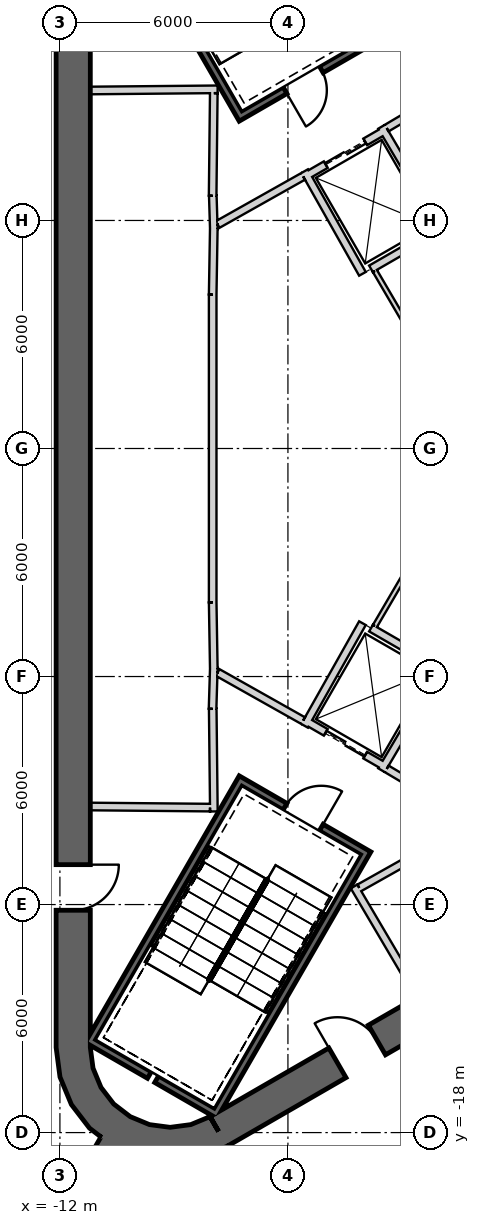
"""IFC4 building model, lengths in metres.
Left out: names, types, materials, properties, quantities, classifications, styles, units other than length and angle.
Written with IfcOpenShell. Run it as: python <this file> out.ifc"""

import sys

from ifc_helpers import new_model, si_unit, direction, frame, frame_2d, origin, place, context, subcontext, project, spatial, polyline, rectangle, outline, extrude, element, fill, save


model = new_model("IFC4")
c1 = context("Model", 3, precision=1e-05, world=origin(), true_north=direction((0.0, 1.0)))
c2 = subcontext(c1, "Body", "Model", "MODEL_VIEW")
j1 = project(units=[si_unit("LENGTHUNIT", "METRE"), si_unit("PLANEANGLEUNIT", "RADIAN")], contexts=[c1])
p1 = place(None, origin())
s1 = spatial("IfcSite", under=j1, at=p1, CompositionType="ELEMENT")
p2 = place(p1, origin())
s2 = spatial("IfcBuilding", under=s1, at=p2, CompositionType="ELEMENT")
p3 = place(p2, frame((0.0, 0.0, 163.2)))
s3 = spatial("IfcBuildingStorey", under=s2, at=p3, CompositionType="ELEMENT", Elevation=163.2)
p4 = place(p3, frame((19.475, 2.208, 0.0), z_axis=(0.0, 0.0, 1.0), x_axis=(-0.866028369851, 0.499994862586, 0.0)))
e1 = element("IfcWall", 1, at=p4, inside=s3, PredefinedType="SHEAR", context=c2, shape_type="SweptSolid", body=[
    extrude(rectangle(XDim=31.523, YDim=0.9, at=frame_2d((15.762, 0.0))), origin(), (0.0, 0.0, 1.0), 6.0),
])
p5 = place(p4, frame((3.612, 0.0, 0.0)))
e2 = element("IfcOpeningElement", 2, at=p5, cuts=e1, PredefinedType="OPENING", context=c2, shape_type="SweptSolid", body=[
    extrude(rectangle(XDim=1.2, YDim=2.4, at=frame_2d((0.6, 1.2))), frame((0.0, 0.46, 0.0), z_axis=(0.0, -1.0, 0.0), x_axis=(1.0, 0.0, 0.0)), (0.0, 0.0, 1.0), 0.92),
])
p6 = place(p4, frame((26.712, 0.0, 0.0)))
e3 = element("IfcOpeningElement", 3, at=p6, cuts=e1, PredefinedType="OPENING", context=c2, shape_type="SweptSolid", body=[
    extrude(rectangle(XDim=1.2, YDim=2.4, at=frame_2d((0.6, 1.2))), frame((0.0, 0.46, 0.0), z_axis=(0.0, -1.0, 0.0), x_axis=(1.0, 0.0, 0.0)), (0.0, 0.0, 1.0), 0.92),
])
p7 = place(p3, frame((-11.65, 15.762, 0.0), z_axis=(0.0, 0.0, 1.0), x_axis=(0.0, -1.0, 0.0)))
e4 = element("IfcWall", 4, at=p7, inside=s3, PredefinedType="SHEAR", context=c2, shape_type="SweptSolid", body=[
    extrude(rectangle(XDim=31.523, YDim=0.9, at=frame_2d((15.762, 0.0))), origin(), (0.0, 0.0, 1.0), 6.0),
])
p8 = place(p7, frame((3.612, 0.0, 0.0)))
e5 = element("IfcOpeningElement", 5, at=p8, cuts=e4, PredefinedType="OPENING", context=c2, shape_type="SweptSolid", body=[
    extrude(rectangle(XDim=1.2, YDim=2.4, at=frame_2d((0.6, 1.2))), frame((0.0, 0.46, 0.0), z_axis=(0.0, -1.0, 0.0), x_axis=(1.0, 0.0, 0.0)), (0.0, 0.0, 1.0), 0.92),
])
p9 = place(p7, frame((26.712, 0.0, 0.0)))
e6 = element("IfcOpeningElement", 6, at=p9, cuts=e4, PredefinedType="OPENING", context=c2, shape_type="SweptSolid", body=[
    extrude(rectangle(XDim=1.2, YDim=2.4, at=frame_2d((0.6, 1.2))), frame((0.0, 0.46, 0.0), z_axis=(0.0, -1.0, 0.0), x_axis=(1.0, 0.0, 0.0)), (0.0, 0.0, 1.0), 0.92),
])
p10 = place(p3, frame((-7.825, -17.97, 0.0), z_axis=(0.0, 0.0, 1.0), x_axis=(0.866028369851, 0.499994862586, 0.0)))
e7 = element("IfcWall", 7, at=p10, inside=s3, PredefinedType="SHEAR", context=c2, shape_type="SweptSolid", body=[
    extrude(rectangle(XDim=31.523, YDim=0.9, at=frame_2d((15.762, 0.0))), origin(), (0.0, 0.0, 1.0), 6.0),
])
p11 = place(p10, frame((26.712, 0.0, 0.0)))
e8 = element("IfcOpeningElement", 8, at=p11, cuts=e7, PredefinedType="OPENING", context=c2, shape_type="SweptSolid", body=[
    extrude(rectangle(XDim=1.2, YDim=2.4, at=frame_2d((0.6, 1.2))), frame((0.0, 0.46, 0.0), z_axis=(0.0, -1.0, 0.0), x_axis=(1.0, 0.0, 0.0)), (0.0, 0.0, 1.0), 0.92),
])
p12 = place(p10, frame((3.612, 0.0, 0.0)))
e9 = element("IfcOpeningElement", 9, at=p12, cuts=e7, PredefinedType="OPENING", context=c2, shape_type="SweptSolid", body=[
    extrude(rectangle(XDim=1.2, YDim=2.4, at=frame_2d((0.6, 1.2))), frame((0.0, 0.46, 0.0), z_axis=(0.0, -1.0, 0.0), x_axis=(1.0, 0.0, 0.0)), (0.0, 0.0, 1.0), 0.92),
])
p13 = place(p3, origin())
e10 = element("IfcWall", 10, at=p13, inside=s3, PredefinedType="SHEAR", context=c2, shape_type="SweptSolid", body=[
    extrude(outline(polyline([(-12.1, -15.762), (-11.998, -16.538), (-11.698, -17.262), (-11.221, -17.883), (-10.6, -18.36), (-9.876, -18.659), (-9.1, -18.762), (-8.323, -18.659), (-7.6, -18.36), (-8.05, -17.58), (-8.556, -17.79), (-9.1, -17.862), (-9.644, -17.79), (-10.15, -17.58), (-10.585, -17.247), (-10.919, -16.812), (-11.128, -16.305), (-11.2, -15.762), (-12.1, -15.762)])), origin(), (0.0, 0.0, 1.0), 6.0),
])
p14 = place(p3, frame((-10.575, -18.316, 0.0), z_axis=(0.0, 0.0, 1.0), x_axis=(-0.500002326941, -0.86602406032, 0.0)))
e11 = element("IfcWall", 11, at=p14, inside=s3, PredefinedType="SHEAR", context=c2, shape_type="SweptSolid", body=[
    extrude(rectangle(XDim=12.384, YDim=0.8, at=frame_2d((6.192, 0.0))), origin(), (0.0, 0.0, 1.0), 6.0),
])
p15 = place(p14, frame((1.2, 0.0, 0.0)))
e12 = element("IfcOpeningElement", 12, at=p15, cuts=e11, PredefinedType="OPENING", context=c2, shape_type="SweptSolid", body=[
    extrude(rectangle(XDim=1.4, YDim=2.4, at=frame_2d((0.7, 1.2))), frame((0.0, 0.41, 0.0), z_axis=(0.0, -1.0, 0.0), x_axis=(1.0, 0.0, 0.0)), (0.0, 0.0, 1.0), 0.82),
])
p16 = place(p3, frame((-3.41, -32.318, 0.0), z_axis=(0.0, 0.0, 1.0), x_axis=(0.852773716093, 0.52228056554, 0.0)))
e13 = element("IfcWall", 13, at=p16, inside=s3, PredefinedType="SOLIDWALL", context=c2, shape_type="SweptSolid", body=[
    extrude(rectangle(XDim=38.239, YDim=0.24, at=frame_2d((19.12, 0.0))), origin(), (0.0, 0.0, 1.0), 5.7),
])
p17 = place(p3, frame((-11.2, 9.42, 0.0), z_axis=(0.0, 0.0, 1.0), x_axis=(0.999957167047, 0.009255488683, 0.0)))
e14 = element("IfcWall", 14, at=p17, inside=s3, PredefinedType="PLUMBINGWALL", context=c2, shape_type="SweptSolid", body=[
    extrude(rectangle(XDim=3.35, YDim=0.2, at=frame_2d((1.675, 0.0))), origin(), (0.0, 0.0, 1.0), 5.7),
])
p18 = place(p3, frame((-7.951, 9.35, 0.0), z_axis=(0.0, 0.0, 1.0), x_axis=(-0.011120469654, -0.999938165666, 0.0)))
e15 = element("IfcWall", 15, at=p18, inside=s3, PredefinedType="PLUMBINGWALL", context=c2, shape_type="SweptSolid", body=[
    extrude(rectangle(XDim=2.7, YDim=0.2, at=frame_2d((1.35, 0.0))), origin(), (0.0, 0.0, 1.0), 5.7),
])
p19 = place(p3, frame((-7.977, 6.65, 0.0), z_axis=(0.0, 0.0, 1.0), x_axis=(0.030861509705, -0.999523670164, 0.0)))
e16 = element("IfcWall", 16, at=p19, inside=s3, PredefinedType="PLUMBINGWALL", context=c2, shape_type="SweptSolid", body=[
    extrude(rectangle(XDim=0.878, YDim=0.2, at=frame_2d((0.439, 0.0))), origin(), (0.0, 0.0, 1.0), 5.7),
])
p20 = place(p3, frame((-7.949, 5.894, 0.0), z_axis=(0.0, 0.0, 1.0), x_axis=(-0.016809909365, -0.999858703491, 0.0)))
e17 = element("IfcWall", 17, at=p20, inside=s3, PredefinedType="PLUMBINGWALL", context=c2, shape_type="SweptSolid", body=[
    extrude(rectangle(XDim=1.844, YDim=0.2, at=frame_2d((0.922, 0.0))), origin(), (0.0, 0.0, 1.0), 5.7),
])
p21 = place(p3, frame((-7.98, 4.05, 0.0), z_axis=(0.0, 0.0, 1.0), x_axis=(0.0, -1.0, 0.0)))
e18 = element("IfcWall", 18, at=p21, inside=s3, PredefinedType="PLUMBINGWALL", context=c2, shape_type="SweptSolid", body=[
    extrude(rectangle(XDim=8.1, YDim=0.2, at=frame_2d((4.05, 0.0))), origin(), (0.0, 0.0, 1.0), 5.7),
])
p22 = place(p3, frame((-7.95, -5.772, 0.0), z_axis=(0.0, 0.0, 1.0), x_axis=(-0.030803413295, -0.999525462272, 0.0)))
e19 = element("IfcWall", 19, at=p22, inside=s3, PredefinedType="PLUMBINGWALL", context=c2, shape_type="SweptSolid", body=[
    extrude(rectangle(XDim=1.078, YDim=0.2, at=frame_2d((0.539, 0.0))), origin(), (0.0, 0.0, 1.0), 5.7),
])
p23 = place(p3, frame((-7.98, -4.05, 0.0), z_axis=(0.0, 0.0, 1.0), x_axis=(0.016809909365, -0.999858703491, 0.0)))
e20 = element("IfcWall", 20, at=p23, inside=s3, PredefinedType="PLUMBINGWALL", context=c2, shape_type="SweptSolid", body=[
    extrude(rectangle(XDim=1.844, YDim=0.2, at=frame_2d((0.922, 0.0))), origin(), (0.0, 0.0, 1.0), 5.7),
])
p24 = place(p3, frame((-7.979, -6.85, 0.0), z_axis=(0.0, 0.0, 1.0), x_axis=(0.011121475088, -0.999938154483, 0.0)))
e21 = element("IfcWall", 21, at=p24, inside=s3, PredefinedType="PLUMBINGWALL", context=c2, shape_type="SweptSolid", body=[
    extrude(rectangle(XDim=2.7, YDim=0.2, at=frame_2d((1.35, 0.0))), origin(), (0.0, 0.0, 1.0), 5.7),
])
p25 = place(p3, frame((-8.05, -9.449, 0.0), z_axis=(0.0, 0.0, 1.0), x_axis=(-0.999957467379, 0.009222983926, 0.0)))
e22 = element("IfcWall", 22, at=p25, inside=s3, PredefinedType="PLUMBINGWALL", context=c2, shape_type="SweptSolid", body=[
    extrude(rectangle(XDim=3.15, YDim=0.2, at=frame_2d((1.575, 0.0))), origin(), (0.0, 0.0, 1.0), 5.7),
])
p26 = place(p3, frame((-2.558, -14.409, 0.0), z_axis=(0.0, 0.0, 1.0), x_axis=(-0.507997497166, 0.861358544901, 0.0)))
e23 = element("IfcWall", 23, at=p26, inside=s3, PredefinedType="PLUMBINGWALL", context=c2, shape_type="SweptSolid", body=[
    extrude(rectangle(XDim=3.35, YDim=0.2, at=frame_2d((1.675, 0.0))), origin(), (0.0, 0.0, 1.0), 5.7),
])
p27 = place(p3, frame((-1.769, -10.237, 0.0), z_axis=(0.0, 0.0, 1.0), x_axis=(-0.871534483978, -0.490334215854, 0.0)))
e24 = element("IfcWall", 24, at=p27, inside=s3, PredefinedType="PLUMBINGWALL", context=c2, shape_type="SweptSolid", body=[
    extrude(rectangle(XDim=2.7, YDim=0.2, at=frame_2d((1.35, 0.0))), origin(), (0.0, 0.0, 1.0), 5.7),
])
p28 = place(p3, frame((-11.245, 15.678, -0.35), z_axis=(0.0, 0.0, 1.0), x_axis=(0.499977274689, -0.866038523851, 0.0)))
e25 = element("IfcWall", 25, at=p28, inside=s3, PredefinedType="SHEAR", context=c2, shape_type="SweptSolid", body=[
    extrude(rectangle(XDim=8.1, YDim=0.2, at=frame_2d((4.05, 0.0))), origin(), (0.0, 0.0, 1.0), 6.05),
])
p29 = place(p3, frame((-7.159, 8.8, -0.35), z_axis=(0.0, 0.0, 1.0), x_axis=(0.866047807691, 0.499961193289, 0.0)))
e26 = element("IfcWall", 26, at=p29, inside=s3, PredefinedType="SHEAR", context=c2, shape_type="SweptSolid", body=[
    extrude(rectangle(XDim=3.6, YDim=0.2, at=frame_2d((1.8, 0.0))), origin(), (0.0, 0.0, 1.0), 6.05),
])
p30 = place(p29, frame((1.25, 0.0, 0.35)))
e27 = element("IfcOpeningElement", 27, at=p30, cuts=e26, PredefinedType="OPENING", context=c2, shape_type="SweptSolid", body=[
    extrude(rectangle(XDim=1.1, YDim=2.1, at=frame_2d((0.55, 1.05))), frame((0.0, 0.11, 0.0), z_axis=(0.0, -1.0, 0.0), x_axis=(1.0, 0.0, 0.0)), (0.0, 0.0, 1.0), 0.22),
])
p31 = place(p3, frame((-5.524, 7.168, 0.0), z_axis=(0.0, 0.0, 1.0), x_axis=(0.866024647952, 0.500001309137, 0.0)))
e28 = element("IfcWall", 28, at=p31, inside=s3, PredefinedType="PLUMBINGWALL", context=c2, shape_type="SweptSolid", body=[
    extrude(rectangle(XDim=2.4, YDim=0.2, at=frame_2d((1.2, 0.0))), origin(), (0.0, 0.0, 1.0), 5.7),
])
p32 = place(p31, frame((0.6, 0.0, 0.0)))
e29 = element("IfcOpeningElement", 29, at=p32, cuts=e28, PredefinedType="OPENING", context=c2, shape_type="SweptSolid", body=[
    extrude(rectangle(XDim=1.2, YDim=2.4, at=frame_2d((0.6, 1.2))), frame((0.0, 0.11, 0.0), z_axis=(0.0, -1.0, 0.0), x_axis=(1.0, 0.0, 0.0)), (0.0, 0.0, 1.0), 0.22),
])
p33 = place(p3, frame((-4.039, 4.596, 0.0), z_axis=(0.0, 0.0, 1.0), x_axis=(-0.491322718731, 0.870977603649, 0.0)))
e30 = element("IfcWall", 30, at=p33, inside=s3, PredefinedType="PLUMBINGWALL", context=c2, shape_type="SweptSolid", body=[
    extrude(rectangle(XDim=3.1, YDim=0.2, at=frame_2d((1.55, 0.0))), origin(), (0.0, 0.0, 1.0), 5.7),
])
p34 = place(p3, frame((-3.538, 8.465, 0.0), z_axis=(0.0, 0.0, 1.0), x_axis=(0.508616218331, -0.860993346345, 0.0)))
e31 = element("IfcWall", 31, at=p34, inside=s3, PredefinedType="PLUMBINGWALL", context=c2, shape_type="SweptSolid", body=[
    extrude(rectangle(XDim=3.2, YDim=0.2, at=frame_2d((1.6, 0.0))), origin(), (0.0, 0.0, 1.0), 5.7),
])
p35 = place(p3, frame((-2.047, 5.746, 0.0), z_axis=(0.0, 0.0, 1.0), x_axis=(-0.866032100247, -0.499988401207, 0.0)))
e32 = element("IfcWall", 32, at=p35, inside=s3, PredefinedType="PLUMBINGWALL", context=c2, shape_type="SweptSolid", body=[
    extrude(rectangle(XDim=2.04, YDim=0.2, at=frame_2d((1.02, 0.0))), origin(), (0.0, 0.0, 1.0), 5.7),
])
p36 = place(p3, frame((-3.905, -10.563, -0.35), z_axis=(0.0, 0.0, 1.0), x_axis=(-0.500012932018, -0.866017937352, 0.0)))
e33 = element("IfcWall", 33, at=p36, inside=s3, PredefinedType="SHEAR", context=c2, shape_type="SweptSolid", body=[
    extrude(rectangle(XDim=8.1, YDim=0.2, at=frame_2d((4.05, 0.0))), origin(), (0.0, 0.0, 1.0), 6.05),
])
p37 = place(p3, frame((-11.282, -15.541, -0.35), z_axis=(0.0, 0.0, 1.0), x_axis=(0.866000578957, -0.500042995397, 0.0)))
e34 = element("IfcWall", 34, at=p37, inside=s3, PredefinedType="SHEAR", context=c2, shape_type="SweptSolid", body=[
    extrude(rectangle(XDim=1.89, YDim=0.2, at=frame_2d((0.945, 0.0))), origin(), (0.0, 0.0, 1.0), 6.05),
])
p38 = place(p3, frame((-9.455, -16.596, -0.35), z_axis=(0.0, 0.0, 1.0), x_axis=(0.866038843867, -0.499976720371, 0.0)))
e35 = element("IfcWall", 35, at=p38, inside=s3, PredefinedType="SHEAR", context=c2, shape_type="SweptSolid", body=[
    extrude(rectangle(XDim=1.69, YDim=0.2, at=frame_2d((0.845, 0.0))), origin(), (0.0, 0.0, 1.0), 6.05),
])
p39 = place(p3, frame((-7.196, -8.663, -0.35), z_axis=(0.0, 0.0, 1.0), x_axis=(-0.499997992926, -0.866026562566, 0.0)))
e36 = element("IfcWall", 36, at=p39, inside=s3, PredefinedType="SHEAR", context=c2, shape_type="SweptSolid", body=[
    extrude(rectangle(XDim=7.9, YDim=0.2, at=frame_2d((3.95, 0.0))), origin(), (0.0, 0.0, 1.0), 6.05),
])
p40 = place(p3, frame((-4.041, -10.599, -0.35), z_axis=(0.0, 0.0, 1.0), x_axis=(-0.866047807691, 0.499961193289, 0.0)))
e37 = element("IfcWall", 37, at=p40, inside=s3, PredefinedType="SHEAR", context=c2, shape_type="SweptSolid", body=[
    extrude(rectangle(XDim=3.6, YDim=0.2, at=frame_2d((1.8, 0.0))), origin(), (0.0, 0.0, 1.0), 6.05),
])
p41 = place(p40, frame((1.25, 0.0, 0.35)))
e38 = element("IfcOpeningElement", 38, at=p41, cuts=e37, PredefinedType="OPENING", context=c2, shape_type="SweptSolid", body=[
    extrude(rectangle(XDim=1.1, YDim=2.1, at=frame_2d((0.55, 1.05))), frame((0.0, 0.11, 0.0), z_axis=(0.0, -1.0, 0.0), x_axis=(1.0, 0.0, 0.0)), (0.0, 0.0, 1.0), 0.22),
])
p42 = place(p3, frame((-3.446, -8.368, 0.0), z_axis=(0.0, 0.0, 1.0), x_axis=(-0.866024647952, 0.500001309137, 0.0)))
e39 = element("IfcWall", 39, at=p42, inside=s3, PredefinedType="PLUMBINGWALL", context=c2, shape_type="SweptSolid", body=[
    extrude(rectangle(XDim=2.4, YDim=0.2, at=frame_2d((1.2, 0.0))), origin(), (0.0, 0.0, 1.0), 5.7),
])
p43 = place(p42, frame((0.6, 0.0, 0.0)))
e40 = element("IfcOpeningElement", 40, at=p43, cuts=e39, PredefinedType="OPENING", context=c2, shape_type="SweptSolid", body=[
    extrude(rectangle(XDim=1.2, YDim=2.4, at=frame_2d((0.6, 1.2))), frame((0.0, 0.11, 0.0), z_axis=(0.0, -1.0, 0.0), x_axis=(1.0, 0.0, 0.0)), (0.0, 0.0, 1.0), 0.22),
])
p44 = place(p3, frame((-5.562, -7.296, 0.0), z_axis=(0.0, 0.0, 1.0), x_axis=(0.491322718731, 0.870977603649, 0.0)))
e41 = element("IfcWall", 41, at=p44, inside=s3, PredefinedType="PLUMBINGWALL", context=c2, shape_type="SweptSolid", body=[
    extrude(rectangle(XDim=3.1, YDim=0.2, at=frame_2d((1.55, 0.0))), origin(), (0.0, 0.0, 1.0), 5.7),
])
p45 = place(p3, frame((-3.814, -4.726, 0.0), z_axis=(0.0, 0.0, 1.0), x_axis=(0.866000409959, -0.500043288077, 0.0)))
e42 = element("IfcWall", 42, at=p45, inside=s3, PredefinedType="PLUMBINGWALL", context=c2, shape_type="SweptSolid", body=[
    extrude(rectangle(XDim=2.24, YDim=0.2, at=frame_2d((1.12, 0.0))), origin(), (0.0, 0.0, 1.0), 5.7),
])
p46 = place(p3, frame((-2.012, -5.882, 0.0), z_axis=(0.0, 0.0, 1.0), x_axis=(-0.508619639323, -0.860991325447, 0.0)))
e43 = element("IfcWall", 43, at=p46, inside=s3, PredefinedType="PLUMBINGWALL", context=c2, shape_type="SweptSolid", body=[
    extrude(rectangle(XDim=3.0, YDim=0.2, at=frame_2d((1.5, 0.0))), origin(), (0.0, 0.0, 1.0), 5.7),
])
p47 = place(p3, frame((-4.296, 11.659, 0.0), z_axis=(0.0, 0.0, 1.0), x_axis=(0.871534483978, -0.490334215854, 0.0)))
e44 = element("IfcWall", 44, at=p47, inside=s3, PredefinedType="PARTITIONING", context=c2, shape_type="SweptSolid", body=[
    extrude(rectangle(XDim=2.7, YDim=0.2, at=frame_2d((1.35, 0.0))), origin(), (0.0, 0.0, 1.0), 5.7),
])
p48 = place(p3, frame((-5.6, 7.16, 0.0), z_axis=(0.0, 0.0, 1.0), x_axis=(-0.871340486379, -0.490678873396, 0.0)))
e45 = element("IfcWall", 45, at=p48, inside=s3, PredefinedType="PARTITIONING", context=c2, shape_type="SweptSolid", body=[
    extrude(rectangle(XDim=2.581, YDim=0.2, at=frame_2d((1.291, 0.0))), origin(), (0.0, 0.0, 1.0), 5.7),
])
p49 = place(p3, frame((-1.07, 9.809, 0.0), z_axis=(0.0, 0.0, 1.0), x_axis=(-0.860603293832, -0.509275927808, 0.0)))
e46 = element("IfcWall", 46, at=p49, inside=s3, PredefinedType="PARTITIONING", context=c2, shape_type="SweptSolid", body=[
    extrude(rectangle(XDim=2.708, YDim=0.2, at=frame_2d((1.354, 0.0))), origin(), (0.0, 0.0, 1.0), 5.7),
])
p50 = place(p49, frame((0.86, 0.0, 0.0)))
e47 = element("IfcOpeningElement", 47, at=p50, cuts=e46, PredefinedType="OPENING", context=c2, shape_type="SweptSolid", body=[
    extrude(rectangle(XDim=1.0, YDim=2.1, at=frame_2d((0.5, 1.05))), frame((0.0, 0.11, 0.0), z_axis=(0.0, -1.0, 0.0), x_axis=(1.0, 0.0, 0.0)), (0.0, 0.0, 1.0), 0.22),
])
p51 = place(p3, frame((-7.849, -5.894, 0.0), z_axis=(0.0, 0.0, 1.0), x_axis=(0.871340486379, -0.490678873396, 0.0)))
e48 = element("IfcWall", 48, at=p51, inside=s3, PredefinedType="PARTITIONING", context=c2, shape_type="SweptSolid", body=[
    extrude(rectangle(XDim=2.581, YDim=0.2, at=frame_2d((1.291, 0.0))), origin(), (0.0, 0.0, 1.0), 5.7),
])
p52 = place(p3, frame((-3.401, -8.43, 0.0), z_axis=(0.0, 0.0, 1.0), x_axis=(0.860598681535, -0.509283721849, 0.0)))
e49 = element("IfcWall", 49, at=p52, inside=s3, PredefinedType="PARTITIONING", context=c2, shape_type="SweptSolid", body=[
    extrude(rectangle(XDim=2.581, YDim=0.2, at=frame_2d((1.291, 0.0))), origin(), (0.0, 0.0, 1.0), 5.7),
])
p53 = place(p52, frame((0.791, 0.0, 0.0)))
e50 = element("IfcOpeningElement", 50, at=p53, cuts=e49, PredefinedType="OPENING", context=c2, shape_type="SweptSolid", body=[
    extrude(rectangle(XDim=1.0, YDim=2.1, at=frame_2d((0.5, 1.05))), frame((0.0, 0.11, 0.0), z_axis=(0.0, -1.0, 0.0), x_axis=(1.0, 0.0, 0.0)), (0.0, 0.0, 1.0), 0.22),
])
p54 = place(p3, frame((-1.42, 0.762, 0.0), z_axis=(0.0, 0.0, 1.0), x_axis=(-0.505655878767, 0.862735261983, 0.0)))
e51 = element("IfcWall", 51, at=p54, inside=s3, PredefinedType="PARTITIONING", context=c2, shape_type="SweptSolid", body=[
    extrude(rectangle(XDim=4.53, YDim=0.12, at=frame_2d((2.265, 0.0))), origin(), (0.0, 0.0, 1.0), 5.7),
])
p55 = place(p54, frame((1.916, 0.0, 0.0)))
e52 = element("IfcOpeningElement", 52, at=p55, cuts=e51, PredefinedType="OPENING", context=c2, shape_type="SweptSolid", body=[
    extrude(rectangle(XDim=0.8, YDim=2.1, at=frame_2d((0.4, 1.05))), frame((0.0, 0.07, 0.0), z_axis=(0.0, -1.0, 0.0), x_axis=(1.0, 0.0, 0.0)), (0.0, 0.0, 1.0), 0.14),
])
p56 = place(p3, frame((-3.711, -4.67, 0.0), z_axis=(0.0, 0.0, 1.0), x_axis=(0.505649867547, 0.862738785178, 0.0)))
e53 = element("IfcWall", 53, at=p56, inside=s3, PredefinedType="PARTITIONING", context=c2, shape_type="SweptSolid", body=[
    extrude(rectangle(XDim=4.409, YDim=0.12, at=frame_2d((2.205, 0.0))), origin(), (0.0, 0.0, 1.0), 5.7),
])
p57 = place(p3, frame((-6.644, -21.503, 0.0), z_axis=(0.0, 0.0, 1.0), x_axis=(0.866024386084, 0.500001762705, 0.0)))
e54 = element("IfcWall", 54, at=p57, inside=s3, PredefinedType="PARTITIONING", context=c2, shape_type="SweptSolid", body=[
    extrude(rectangle(XDim=7.919, YDim=0.2, at=frame_2d((3.96, 0.0))), origin(), (0.0, 0.0, 1.0), 4.88),
])
p58 = place(p57, frame((1.5, 0.0, 0.0)))
e55 = element("IfcOpeningElement", 55, at=p58, cuts=e54, PredefinedType="OPENING", context=c2, shape_type="SweptSolid", body=[
    extrude(rectangle(XDim=1.0, YDim=2.1, at=frame_2d((0.5, 1.05))), frame((0.0, 0.11, 0.0), z_axis=(0.0, -1.0, 0.0), x_axis=(1.0, 0.0, 0.0)), (0.0, 0.0, 1.0), 0.22),
])
p59 = place(p57, frame((5.346, 0.0, 0.0)))
e56 = element("IfcOpeningElement", 56, at=p59, cuts=e54, PredefinedType="OPENING", context=c2, shape_type="SweptSolid", body=[
    extrude(rectangle(XDim=1.0, YDim=2.1, at=frame_2d((0.5, 1.05))), frame((0.0, 0.11, 0.0), z_axis=(0.0, -1.0, 0.0), x_axis=(1.0, 0.0, 0.0)), (0.0, 0.0, 1.0), 0.22),
])
p60 = place(p30, origin())
e57 = element("IfcDoor", 57, at=p60, inside=s3, OperationType="SINGLE_SWING_LEFT", PredefinedType="USERDEFINED", context=c2, shape_type="SweptSolid", body=[
    extrude(rectangle(XDim=1.1, YDim=2.1, at=frame_2d((0.55, 1.05))), frame((0.0, 0.025, 0.0), z_axis=(0.0, -1.0, 0.0), x_axis=(1.0, 0.0, 0.0)), (0.0, 0.0, 1.0), 0.05),
])
fill(e27, e57)
p61 = place(p32, origin())
e58 = element("IfcDoor", 58, at=p61, inside=s3, OperationType="SLIDING_TO_LEFT", PredefinedType="USERDEFINED", context=c2, shape_type="SweptSolid", body=[
    extrude(rectangle(XDim=1.2, YDim=2.4, at=frame_2d((0.6, 1.2))), frame((0.0, 0.025, 0.0), z_axis=(0.0, -1.0, 0.0), x_axis=(1.0, 0.0, 0.0)), (0.0, 0.0, 1.0), 0.05),
])
fill(e29, e58)
p62 = place(p41, origin())
e59 = element("IfcDoor", 59, at=p62, inside=s3, OperationType="SINGLE_SWING_LEFT", PredefinedType="USERDEFINED", context=c2, shape_type="SweptSolid", body=[
    extrude(rectangle(XDim=1.1, YDim=2.1, at=frame_2d((0.55, 1.05))), frame((0.0, 0.025, 0.0), z_axis=(0.0, -1.0, 0.0), x_axis=(1.0, 0.0, 0.0)), (0.0, 0.0, 1.0), 0.05),
])
fill(e38, e59)
p63 = place(p43, origin())
e60 = element("IfcDoor", 60, at=p63, inside=s3, OperationType="SLIDING_TO_LEFT", PredefinedType="USERDEFINED", context=c2, shape_type="SweptSolid", body=[
    extrude(rectangle(XDim=1.2, YDim=2.4, at=frame_2d((0.6, 1.2))), frame((0.0, 0.025, 0.0), z_axis=(0.0, -1.0, 0.0), x_axis=(1.0, 0.0, 0.0)), (0.0, 0.0, 1.0), 0.05),
])
fill(e40, e60)
p64 = place(p9, origin())
e61 = element("IfcDoor", 61, at=p64, inside=s3, OperationType="SINGLE_SWING_LEFT", PredefinedType="USERDEFINED", context=c2, shape_type="SweptSolid", body=[
    extrude(rectangle(XDim=1.2, YDim=2.4, at=frame_2d((0.6, 1.2))), frame((0.0, 0.025, 0.0), z_axis=(0.0, -1.0, 0.0), x_axis=(1.0, 0.0, 0.0)), (0.0, 0.0, 1.0), 0.05),
])
fill(e6, e61)
p65 = place(p12, origin())
e62 = element("IfcDoor", 62, at=p65, inside=s3, OperationType="SINGLE_SWING_LEFT", PredefinedType="USERDEFINED", context=c2, shape_type="SweptSolid", body=[
    extrude(rectangle(XDim=1.2, YDim=2.4, at=frame_2d((0.6, 1.2))), frame((0.0, 0.025, 0.0), z_axis=(0.0, -1.0, 0.0), x_axis=(1.0, 0.0, 0.0)), (0.0, 0.0, 1.0), 0.05),
])
fill(e9, e62)
save(model, sys.argv[1])
